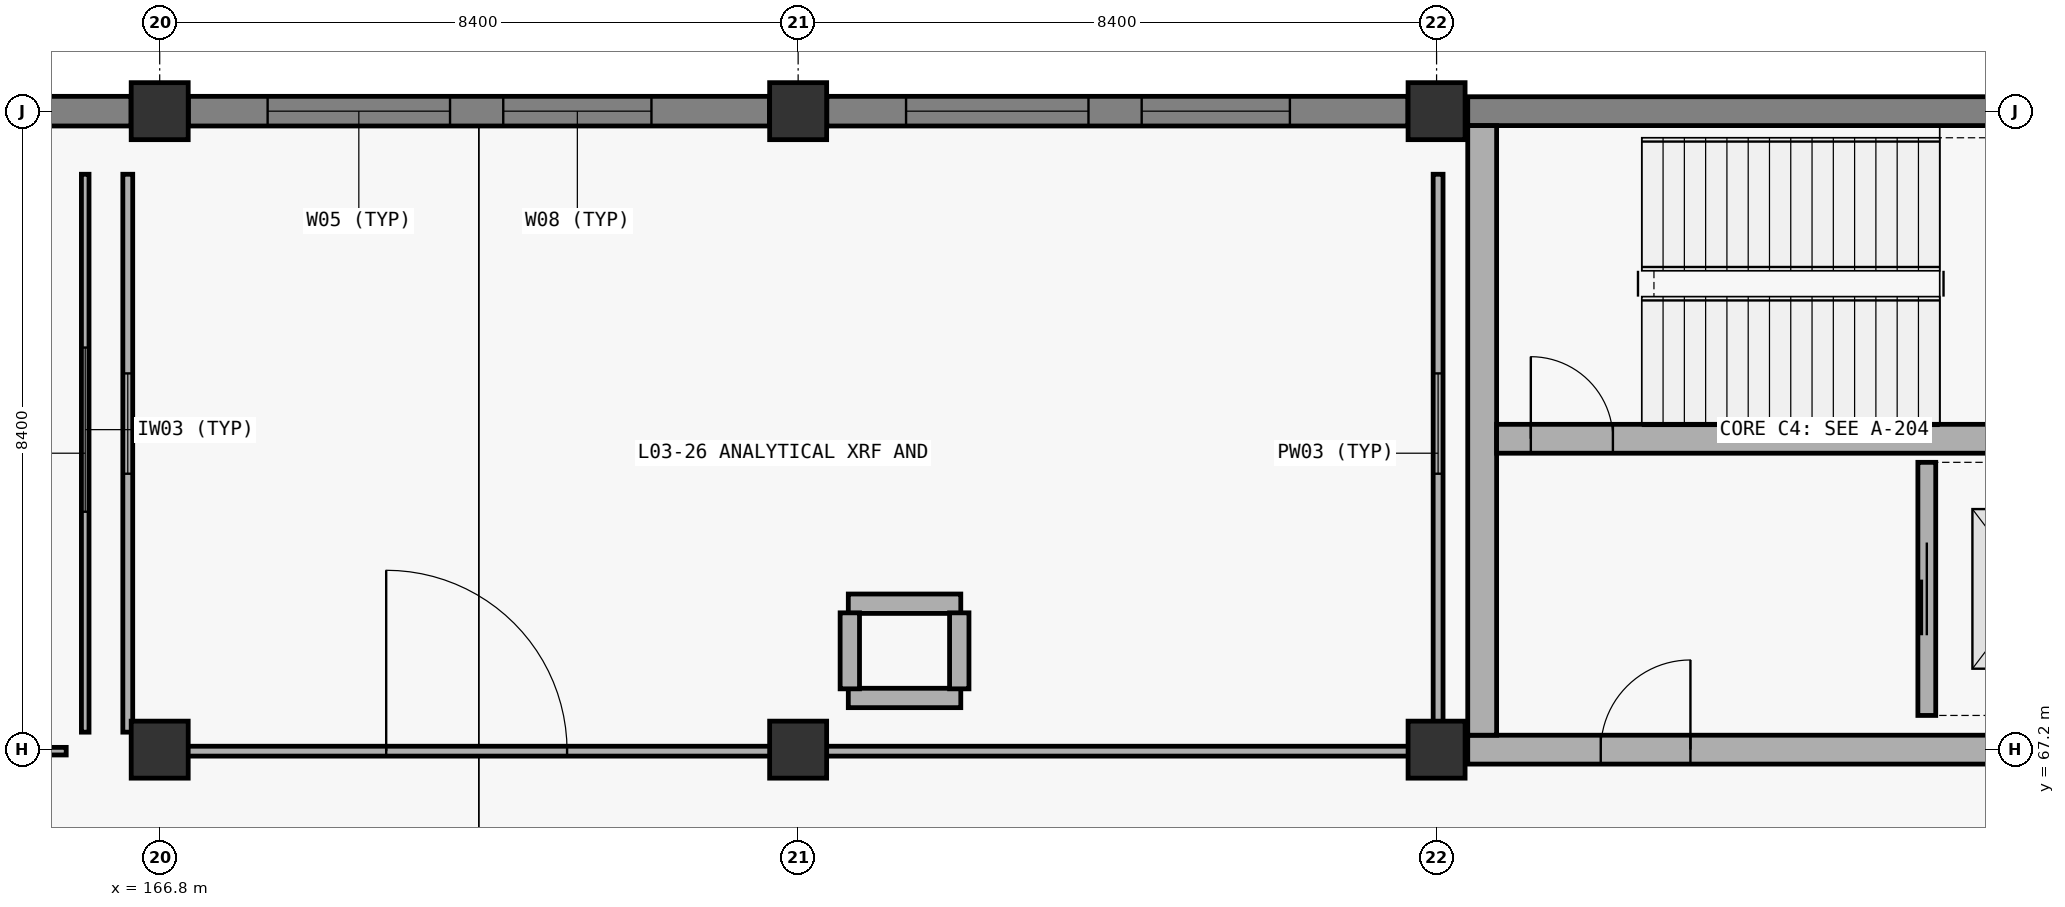
"""IFC4 building model, lengths in metres.
Left out: names, types, materials, properties, quantities, classifications, styles, units other than length and angle.
Written with IfcOpenShell. Run it as: python <this file> out.ifc"""

import sys

from ifc_helpers import new_model, si_unit, direction, frame, frame_2d, origin, origin_2d, place, context, subcontext, project, spatial, rectangle, extrude, element, fill, save


model = new_model("IFC4")
c1 = context("Model", 3, precision=1e-05, world=origin(), true_north=direction((0.0, 1.0)))
c2 = subcontext(c1, "Body", "Model", "MODEL_VIEW")
j1 = project(units=[si_unit("LENGTHUNIT", "METRE"), si_unit("PLANEANGLEUNIT", "RADIAN")], contexts=[c1])
p1 = place(None, origin())
s1 = spatial("IfcSite", under=j1, at=p1, CompositionType="ELEMENT")
p2 = place(p1, origin())
s2 = spatial("IfcBuilding", under=s1, at=p2, CompositionType="ELEMENT")
p3 = place(p2, frame((0.0, 0.0, 15.6)))
s3 = spatial("IfcBuildingStorey", under=s2, at=p3, CompositionType="ELEMENT", Elevation=15.6)
for number, where, z_axis, x_axis in (
    (1, (166.8, 67.2, 0.0), (0.0, 0.0, 1.0), (1.0, 0.0, 0.0)),
    (2, (166.8, 75.6, 0.0), (0.0, 0.0, 1.0), (1.0, 0.0, 0.0)),
    (3, (175.2, 67.2, 0.0), (0.0, 0.0, 1.0), (1.0, 0.0, 0.0)),
    (4, (175.2, 75.6, 0.0), (0.0, 0.0, 1.0), (1.0, 0.0, 0.0)),
    (5, (183.6, 67.2, 0.0), (0.0, 0.0, 1.0), (1.0, 0.0, 0.0)),
    (6, (183.6, 75.6, 0.0), (0.0, 0.0, 1.0), (1.0, 0.0, 0.0)),
):
    element("IfcColumn", number, at=place(p3, frame(where, z_axis=z_axis, x_axis=x_axis)), inside=s3, PredefinedType="COLUMN", context=c2, shape_type="SweptSolid", body=[
        extrude(rectangle(XDim=0.75, YDim=0.75, at=origin_2d()), origin(), (0.0, 0.0, 1.0), 5.1),
    ])
p4 = place(p3, frame((184.01, 67.2, 0.0), z_axis=(0.0, 0.0, 1.0), x_axis=(1.0, 0.0, 0.0)))
e7 = element("IfcWall", 7, at=p4, inside=s3, PredefinedType="SHEAR", context=c2, shape_type="SweptSolid", body=[
    extrude(rectangle(XDim=9.38, YDim=0.38, at=frame_2d((4.69, 0.0))), origin(), (0.0, 0.0, 1.0), 5.1),
])
p5 = place(p4, frame((1.75, 0.0, 0.0)))
e8 = element("IfcOpeningElement", 8, at=p5, cuts=e7, PredefinedType="OPENING", context=c2, shape_type="SweptSolid", body=[
    extrude(rectangle(XDim=1.18, YDim=2.24, at=frame_2d((0.59, 1.12))), frame((0.0, 0.2, 0.0), z_axis=(0.0, -1.0, 0.0), x_axis=(1.0, 0.0, 0.0)), (0.0, 0.0, 1.0), 0.4),
])
p6 = place(p3, frame((184.01, 75.6, 0.0), z_axis=(0.0, 0.0, 1.0), x_axis=(1.0, 0.0, 0.0)))
e9 = element("IfcWall", 9, at=p6, inside=s3, PredefinedType="SHEAR", context=c2, shape_type="SweptSolid", body=[
    extrude(rectangle(XDim=9.38, YDim=0.38, at=frame_2d((4.69, 0.0))), origin(), (0.0, 0.0, 1.0), 5.1),
])
p7 = place(p3, frame((184.2, 67.39, 0.0), z_axis=(0.0, 0.0, 1.0), x_axis=(0.0, 1.0, 0.0)))
e10 = element("IfcWall", 10, at=p7, inside=s3, PredefinedType="SHEAR", context=c2, shape_type="SweptSolid", body=[
    extrude(rectangle(XDim=8.02, YDim=0.38, at=frame_2d((4.01, 0.0))), origin(), (0.0, 0.0, 1.0), 5.1),
])
p8 = place(p3, frame((184.39, 71.29, 0.0), z_axis=(0.0, 0.0, 1.0), x_axis=(1.0, 0.0, 0.0)))
e11 = element("IfcWall", 11, at=p8, inside=s3, PredefinedType="SHEAR", context=c2, shape_type="SweptSolid", body=[
    extrude(rectangle(XDim=8.62, YDim=0.38, at=frame_2d((4.31, 0.0))), origin(), (0.0, 0.0, 1.0), 5.1),
])
p9 = place(p8, frame((0.45, 0.0, 0.0)))
e12 = element("IfcOpeningElement", 12, at=p9, cuts=e11, PredefinedType="OPENING", context=c2, shape_type="SweptSolid", body=[
    extrude(rectangle(XDim=1.08, YDim=2.18, at=frame_2d((0.54, 1.09))), frame((0.0, 0.2, 0.0), z_axis=(0.0, -1.0, 0.0), x_axis=(1.0, 0.0, 0.0)), (0.0, 0.0, 1.0), 0.4),
])
p10 = place(p3, frame((158.777, 75.6, 0.0), z_axis=(0.0, 0.0, 1.0), x_axis=(1.0, 0.0, 0.0)))
e13 = element("IfcWall", 13, at=p10, inside=s3, PredefinedType="SOLIDWALL", context=c2, shape_type="SweptSolid", body=[
    extrude(rectangle(XDim=7.646, YDim=0.39, at=frame_2d((3.823, 0.0))), origin(), (0.0, 0.0, 1.0), 4.36),
])
p11 = place(p10, frame((1.043, 0.0, 0.85)))
e14 = element("IfcOpeningElement", 14, at=p11, cuts=e13, PredefinedType="OPENING", context=c2, shape_type="SweptSolid", body=[
    extrude(rectangle(XDim=2.4, YDim=2.15, at=frame_2d((1.2, 1.075))), frame((0.0, 0.205, 0.0), z_axis=(0.0, -1.0, 0.0), x_axis=(1.0, 0.0, 0.0)), (0.0, 0.0, 1.0), 0.41),
])
p12 = place(p10, frame((4.143, 0.0, 0.85)))
e15 = element("IfcOpeningElement", 15, at=p12, cuts=e13, PredefinedType="OPENING", context=c2, shape_type="SweptSolid", body=[
    extrude(rectangle(XDim=1.95, YDim=2.3, at=frame_2d((0.975, 1.15))), frame((0.0, 0.205, 0.0), z_axis=(0.0, -1.0, 0.0), x_axis=(1.0, 0.0, 0.0)), (0.0, 0.0, 1.0), 0.41),
])
p13 = place(p3, frame((167.177, 75.6, 0.0), z_axis=(0.0, 0.0, 1.0), x_axis=(1.0, 0.0, 0.0)))
e16 = element("IfcWall", 16, at=p13, inside=s3, PredefinedType="SOLIDWALL", context=c2, shape_type="SweptSolid", body=[
    extrude(rectangle(XDim=7.646, YDim=0.39, at=frame_2d((3.823, 0.0))), origin(), (0.0, 0.0, 1.0), 4.11),
])
p14 = place(p13, frame((1.043, 0.0, 0.85)))
e17 = element("IfcOpeningElement", 17, at=p14, cuts=e16, PredefinedType="OPENING", context=c2, shape_type="SweptSolid", body=[
    extrude(rectangle(XDim=2.4, YDim=2.15, at=frame_2d((1.2, 1.075))), frame((0.0, 0.205, 0.0), z_axis=(0.0, -1.0, 0.0), x_axis=(1.0, 0.0, 0.0)), (0.0, 0.0, 1.0), 0.41),
])
p15 = place(p13, frame((4.143, 0.0, 0.85)))
e18 = element("IfcOpeningElement", 18, at=p15, cuts=e16, PredefinedType="OPENING", context=c2, shape_type="SweptSolid", body=[
    extrude(rectangle(XDim=1.95, YDim=2.3, at=frame_2d((0.975, 1.15))), frame((0.0, 0.205, 0.0), z_axis=(0.0, -1.0, 0.0), x_axis=(1.0, 0.0, 0.0)), (0.0, 0.0, 1.0), 0.41),
])
p16 = place(p3, frame((175.577, 75.6, 0.0), z_axis=(0.0, 0.0, 1.0), x_axis=(1.0, 0.0, 0.0)))
e19 = element("IfcWall", 19, at=p16, inside=s3, PredefinedType="SOLIDWALL", context=c2, shape_type="SweptSolid", body=[
    extrude(rectangle(XDim=7.646, YDim=0.39, at=frame_2d((3.823, 0.0))), origin(), (0.0, 0.0, 1.0), 4.36),
])
p17 = place(p16, frame((1.043, 0.0, 0.85)))
e20 = element("IfcOpeningElement", 20, at=p17, cuts=e19, PredefinedType="OPENING", context=c2, shape_type="SweptSolid", body=[
    extrude(rectangle(XDim=2.4, YDim=2.15, at=frame_2d((1.2, 1.075))), frame((0.0, 0.205, 0.0), z_axis=(0.0, -1.0, 0.0), x_axis=(1.0, 0.0, 0.0)), (0.0, 0.0, 1.0), 0.41),
])
p18 = place(p16, frame((4.143, 0.0, 0.85)))
e21 = element("IfcOpeningElement", 21, at=p18, cuts=e19, PredefinedType="OPENING", context=c2, shape_type="SweptSolid", body=[
    extrude(rectangle(XDim=1.95, YDim=2.3, at=frame_2d((0.975, 1.15))), frame((0.0, 0.205, 0.0), z_axis=(0.0, -1.0, 0.0), x_axis=(1.0, 0.0, 0.0)), (0.0, 0.0, 1.0), 0.41),
])
p19 = place(p3, frame((190.05, 67.65, 0.0), z_axis=(0.0, 0.0, 1.0), x_axis=(0.0, 1.0, 0.0)))
e22 = element("IfcWall", 22, at=p19, inside=s3, PredefinedType="PARTITIONING", context=c2, shape_type="SweptSolid", body=[
    extrude(rectangle(XDim=3.33, YDim=0.235, at=frame_2d((1.665, 0.0))), origin(), (0.0, 0.0, 1.0), 4.72),
])
p20 = place(p19, frame((1.055, 0.0, 0.0)))
e23 = element("IfcOpeningElement", 23, at=p20, cuts=e22, PredefinedType="OPENING", context=c2, shape_type="SweptSolid", body=[
    extrude(rectangle(XDim=1.22, YDim=2.24, at=frame_2d((0.61, 1.12))), frame((0.0, 0.127, 0.0), z_axis=(0.0, -1.0, 0.0), x_axis=(1.0, 0.0, 0.0)), (0.0, 0.0, 1.0), 0.255),
])
for number, where, z_axis, x_axis in (
    (24, (175.86, 69.12, 0.0), (0.0, 0.0, 1.0), (1.0, 0.0, 0.0)),
    (25, (175.86, 67.88, 0.0), (0.0, 0.0, 1.0), (1.0, 0.0, 0.0)),
):
    element("IfcWall", number, at=place(p3, frame(where, z_axis=z_axis, x_axis=x_axis)), inside=s3, PredefinedType="PARTITIONING", context=c2, shape_type="SweptSolid", body=[
        extrude(rectangle(XDim=1.48, YDim=0.255, at=frame_2d((0.74, 0.0))), origin(), (0.0, 0.0, 1.0), 4.72),
    ])
for number, where, z_axis, x_axis in (
    (26, (175.88, 68.0, 0.0), (0.0, 0.0, 1.0), (0.0, 1.0, 0.0)),
    (27, (177.32, 68.0, 0.0), (0.0, 0.0, 1.0), (0.0, 1.0, 0.0)),
):
    element("IfcWall", number, at=place(p3, frame(where, z_axis=z_axis, x_axis=x_axis)), inside=s3, PredefinedType="PARTITIONING", context=c2, shape_type="SweptSolid", body=[
        extrude(rectangle(XDim=1.0, YDim=0.255, at=frame_2d((0.5, 0.0))), origin(), (0.0, 0.0, 1.0), 4.72),
    ])
p21 = place(p3, frame((142.43, 67.18, 0.0), z_axis=(0.0, 0.0, 1.0), x_axis=(1.0, 0.0, 0.0)))
e28 = element("IfcWall", 28, at=p21, inside=s3, PredefinedType="PARTITIONING", context=c2, shape_type="SweptSolid", body=[
    extrude(rectangle(XDim=23.14, YDim=0.1, at=frame_2d((11.57, 0.0))), origin(), (0.0, 0.0, 1.0), 3.81),
])
p22 = place(p21, frame((18.9, 0.0, 0.0)))
e29 = element("IfcOpeningElement", 29, at=p22, cuts=e28, PredefinedType="OPENING", context=c2, shape_type="SweptSolid", body=[
    extrude(rectangle(XDim=2.52, YDim=2.8, at=frame_2d((1.26, 1.4))), frame((0.0, 0.06, 0.0), z_axis=(0.0, -1.0, 0.0), x_axis=(1.0, 0.0, 0.0)), (0.0, 0.0, 1.0), 0.12),
])
p23 = place(p3, frame((165.82, 67.43, 0.0), z_axis=(0.0, 0.0, 1.0), x_axis=(0.0, 1.0, 0.0)))
e30 = element("IfcWall", 30, at=p23, inside=s3, PredefinedType="PARTITIONING", context=c2, shape_type="SweptSolid", body=[
    extrude(rectangle(XDim=7.34, YDim=0.1, at=frame_2d((3.67, 0.0))), origin(), (0.0, 0.0, 1.0), 4.19),
])
p24 = place(p23, frame((2.9, 0.0, 0.9)))
e31 = element("IfcOpeningElement", 31, at=p24, cuts=e30, PredefinedType="OPENING", context=c2, shape_type="SweptSolid", body=[
    extrude(rectangle(XDim=2.16, YDim=1.42, at=frame_2d((1.08, 0.71))), frame((0.0, 0.06, 0.0), z_axis=(0.0, -1.0, 0.0), x_axis=(1.0, 0.0, 0.0)), (0.0, 0.0, 1.0), 0.12),
])
p25 = place(p3, frame((166.63, 67.18, 0.0), z_axis=(0.0, 0.0, 1.0), x_axis=(1.0, 0.0, 0.0)))
e32 = element("IfcWall", 32, at=p25, inside=s3, PredefinedType="PARTITIONING", context=c2, shape_type="SweptSolid", body=[
    extrude(rectangle(XDim=16.74, YDim=0.13, at=frame_2d((8.37, 0.0))), origin(), (0.0, 0.0, 1.0), 4.11),
])
p26 = place(p25, frame((3.15, 0.0, 0.0)))
e33 = element("IfcOpeningElement", 33, at=p26, cuts=e32, PredefinedType="OPENING", context=c2, shape_type="SweptSolid", body=[
    extrude(rectangle(XDim=2.38, YDim=2.74, at=frame_2d((1.19, 1.37))), frame((0.0, 0.075, 0.0), z_axis=(0.0, -1.0, 0.0), x_axis=(1.0, 0.0, 0.0)), (0.0, 0.0, 1.0), 0.15),
])
p27 = place(p3, frame((166.38, 67.43, 0.0), z_axis=(0.0, 0.0, 1.0), x_axis=(0.0, 1.0, 0.0)))
e34 = element("IfcWall", 34, at=p27, inside=s3, PredefinedType="PARTITIONING", context=c2, shape_type="SweptSolid", body=[
    extrude(rectangle(XDim=7.34, YDim=0.13, at=frame_2d((3.67, 0.0))), origin(), (0.0, 0.0, 1.0), 4.19),
])
p28 = place(p27, frame((3.4, 0.0, 0.9)))
e35 = element("IfcOpeningElement", 35, at=p28, cuts=e34, PredefinedType="OPENING", context=c2, shape_type="SweptSolid", body=[
    extrude(rectangle(XDim=1.32, YDim=1.5, at=frame_2d((0.66, 0.75))), frame((0.0, 0.075, 0.0), z_axis=(0.0, -1.0, 0.0), x_axis=(1.0, 0.0, 0.0)), (0.0, 0.0, 1.0), 0.15),
])
p29 = place(p3, frame((183.62, 67.43, 0.0), z_axis=(0.0, 0.0, 1.0), x_axis=(0.0, 1.0, 0.0)))
e36 = element("IfcWall", 36, at=p29, inside=s3, PredefinedType="PARTITIONING", context=c2, shape_type="SweptSolid", body=[
    extrude(rectangle(XDim=7.34, YDim=0.13, at=frame_2d((3.67, 0.0))), origin(), (0.0, 0.0, 1.0), 3.91),
])
p30 = place(p29, frame((3.4, 0.0, 0.9)))
e37 = element("IfcOpeningElement", 37, at=p30, cuts=e36, PredefinedType="OPENING", context=c2, shape_type="SweptSolid", body=[
    extrude(rectangle(XDim=1.32, YDim=1.5, at=frame_2d((0.66, 0.75))), frame((0.0, 0.075, 0.0), z_axis=(0.0, -1.0, 0.0), x_axis=(1.0, 0.0, 0.0)), (0.0, 0.0, 1.0), 0.15),
])
p31 = place(p14, origin())
e38 = element("IfcWindow", 38, at=p31, inside=s3, PartitioningType="SINGLE_PANEL", PredefinedType="WINDOW", context=c2, shape_type="SweptSolid", body=[
    extrude(rectangle(XDim=2.4, YDim=2.15, at=frame_2d((1.2, 1.075))), frame((0.0, 0.03, 0.0), z_axis=(0.0, -1.0, 0.0), x_axis=(1.0, 0.0, 0.0)), (0.0, 0.0, 1.0), 0.06),
])
fill(e17, e38)
p32 = place(p15, origin())
e39 = element("IfcWindow", 39, at=p32, inside=s3, PartitioningType="SINGLE_PANEL", PredefinedType="WINDOW", context=c2, shape_type="SweptSolid", body=[
    extrude(rectangle(XDim=1.95, YDim=2.3, at=frame_2d((0.975, 1.15))), frame((0.0, 0.03, 0.0), z_axis=(0.0, -1.0, 0.0), x_axis=(1.0, 0.0, 0.0)), (0.0, 0.0, 1.0), 0.06),
])
fill(e18, e39)
p33 = place(p17, origin())
e40 = element("IfcWindow", 40, at=p33, inside=s3, PartitioningType="SINGLE_PANEL", PredefinedType="WINDOW", context=c2, shape_type="SweptSolid", body=[
    extrude(rectangle(XDim=2.4, YDim=2.15, at=frame_2d((1.2, 1.075))), frame((0.0, 0.03, 0.0), z_axis=(0.0, -1.0, 0.0), x_axis=(1.0, 0.0, 0.0)), (0.0, 0.0, 1.0), 0.06),
])
fill(e20, e40)
p34 = place(p18, origin())
e41 = element("IfcWindow", 41, at=p34, inside=s3, PartitioningType="SINGLE_PANEL", PredefinedType="WINDOW", context=c2, shape_type="SweptSolid", body=[
    extrude(rectangle(XDim=1.95, YDim=2.3, at=frame_2d((0.975, 1.15))), frame((0.0, 0.03, 0.0), z_axis=(0.0, -1.0, 0.0), x_axis=(1.0, 0.0, 0.0)), (0.0, 0.0, 1.0), 0.06),
])
fill(e21, e41)
p35 = place(p9, origin())
e42 = element("IfcDoor", 42, at=p35, inside=s3, OperationType="SINGLE_SWING_LEFT", PredefinedType="DOOR", context=c2, shape_type="SweptSolid", body=[
    extrude(rectangle(XDim=1.08, YDim=2.18, at=frame_2d((0.54, 1.09))), frame((0.0, 0.025, 0.0), z_axis=(0.0, -1.0, 0.0), x_axis=(1.0, 0.0, 0.0)), (0.0, 0.0, 1.0), 0.05),
])
fill(e12, e42)
p36 = place(p5, origin())
e43 = element("IfcDoor", 43, at=p36, inside=s3, OperationType="SINGLE_SWING_RIGHT", PredefinedType="DOOR", context=c2, shape_type="SweptSolid", body=[
    extrude(rectangle(XDim=1.18, YDim=2.24, at=frame_2d((0.59, 1.12))), frame((0.0, 0.025, 0.0), z_axis=(0.0, -1.0, 0.0), x_axis=(1.0, 0.0, 0.0)), (0.0, 0.0, 1.0), 0.05),
])
fill(e8, e43)
p37 = place(p20, origin())
e44 = element("IfcDoor", 44, at=p37, inside=s3, OperationType="SLIDING_TO_RIGHT", PredefinedType="DOOR", context=c2, shape_type="SweptSolid", body=[
    extrude(rectangle(XDim=1.22, YDim=2.24, at=frame_2d((0.61, 1.12))), frame((0.0, 0.025, 0.0), z_axis=(0.0, -1.0, 0.0), x_axis=(1.0, 0.0, 0.0)), (0.0, 0.0, 1.0), 0.05),
])
fill(e23, e44)
p38 = place(p24, origin())
e45 = element("IfcWindow", 45, at=p38, inside=s3, PartitioningType="SINGLE_PANEL", PredefinedType="WINDOW", context=c2, shape_type="SweptSolid", body=[
    extrude(rectangle(XDim=2.16, YDim=1.42, at=frame_2d((1.08, 0.71))), frame((0.0, 0.03, 0.0), z_axis=(0.0, -1.0, 0.0), x_axis=(1.0, 0.0, 0.0)), (0.0, 0.0, 1.0), 0.06),
])
fill(e31, e45)
p39 = place(p26, origin())
e46 = element("IfcDoor", 46, at=p39, inside=s3, OperationType="DOUBLE_SWING_LEFT", PredefinedType="GATE", context=c2, shape_type="SweptSolid", body=[
    extrude(rectangle(XDim=2.38, YDim=2.74, at=frame_2d((1.19, 1.37))), frame((0.0, 0.025, 0.0), z_axis=(0.0, -1.0, 0.0), x_axis=(1.0, 0.0, 0.0)), (0.0, 0.0, 1.0), 0.05),
])
fill(e33, e46)
p40 = place(p28, origin())
e47 = element("IfcWindow", 47, at=p40, inside=s3, PartitioningType="SINGLE_PANEL", PredefinedType="WINDOW", context=c2, shape_type="SweptSolid", body=[
    extrude(rectangle(XDim=1.32, YDim=1.5, at=frame_2d((0.66, 0.75))), frame((0.0, 0.03, 0.0), z_axis=(0.0, -1.0, 0.0), x_axis=(1.0, 0.0, 0.0)), (0.0, 0.0, 1.0), 0.06),
])
fill(e35, e47)
p41 = place(p30, origin())
e48 = element("IfcWindow", 48, at=p41, inside=s3, PartitioningType="SINGLE_PANEL", PredefinedType="WINDOW", context=c2, shape_type="SweptSolid", body=[
    extrude(rectangle(XDim=1.32, YDim=1.5, at=frame_2d((0.66, 0.75))), frame((0.0, 0.03, 0.0), z_axis=(0.0, -1.0, 0.0), x_axis=(1.0, 0.0, 0.0)), (0.0, 0.0, 1.0), 0.06),
])
fill(e37, e48)
save(model, sys.argv[1])
